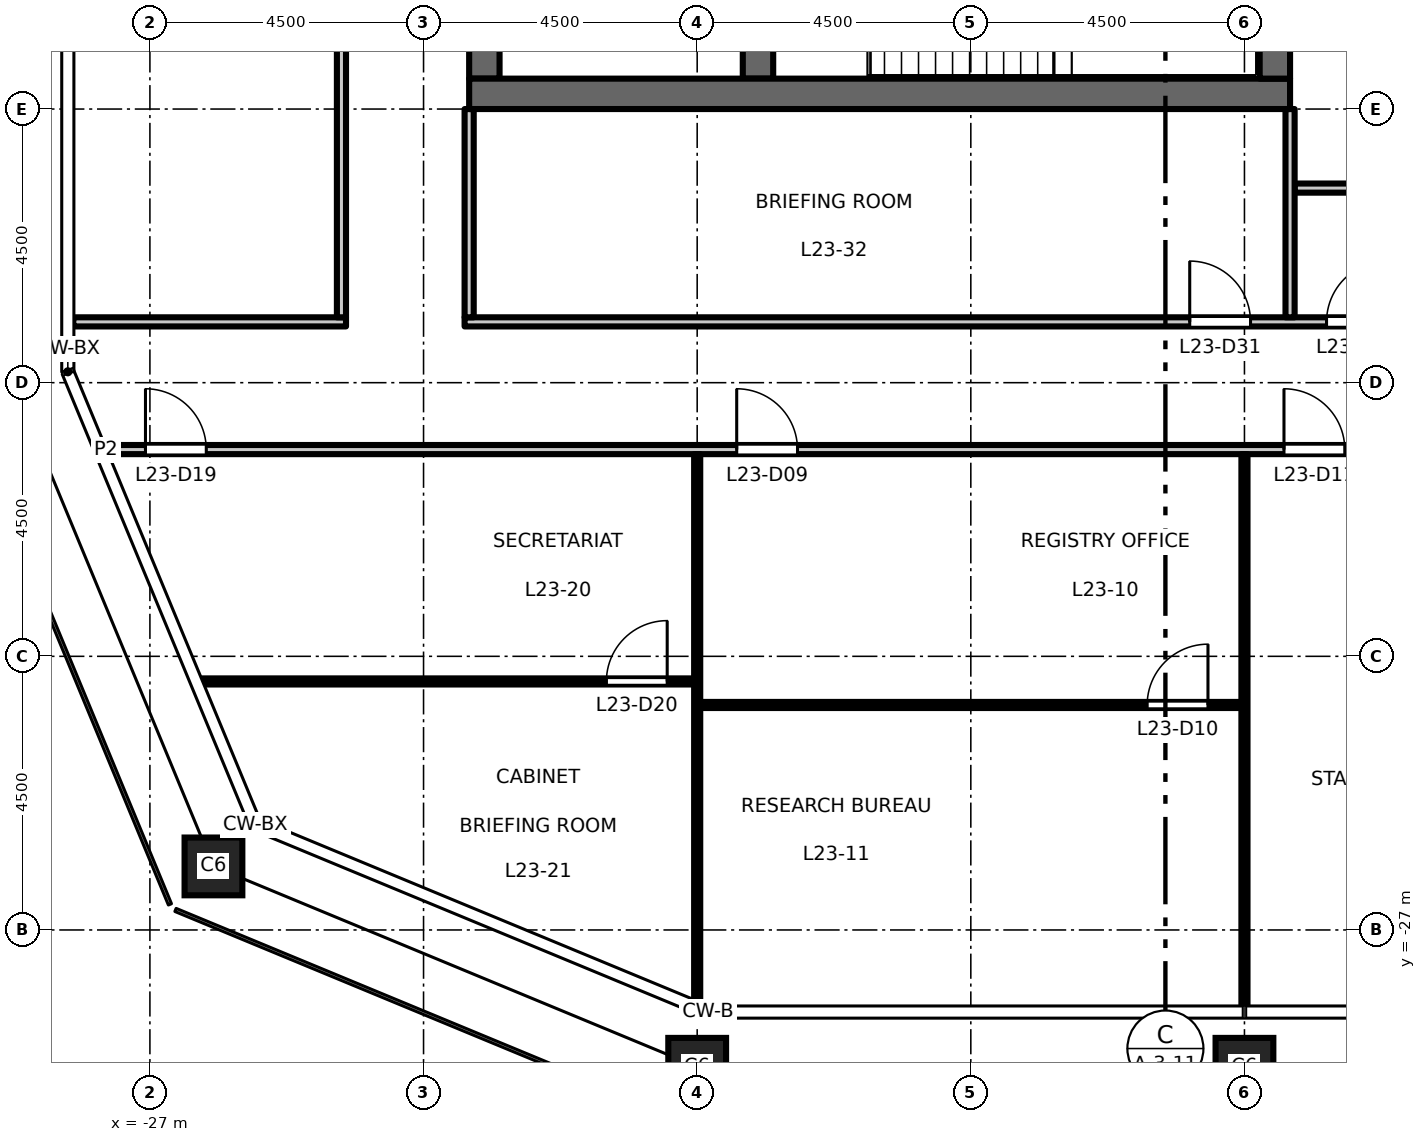
"""IFC4 building model, lengths in metres.
Left out: names, types, materials, properties, quantities, classifications, styles, units other than length and angle.
Written with IfcOpenShell. Run it as: python <this file> out.ifc"""

import sys

from ifc_helpers import new_model, si_unit, direction, frame, frame_2d, origin, origin_2d, place, context, subcontext, project, spatial, rectangle, hollow_rectangle, extrude, element, fill, save


model = new_model("IFC4")
c1 = context("Model", 3, precision=1e-05, world=origin(), true_north=direction((0.0, 1.0)))
c2 = subcontext(c1, "Body", "Model", "MODEL_VIEW")
j1 = project(units=[si_unit("LENGTHUNIT", "METRE"), si_unit("PLANEANGLEUNIT", "RADIAN")], contexts=[c1])
p1 = place(None, origin())
s1 = spatial("IfcSite", under=j1, at=p1, CompositionType="ELEMENT")
p2 = place(p1, origin())
s2 = spatial("IfcBuilding", under=s1, at=p2, CompositionType="ELEMENT")
p3 = place(p2, frame((0.0, 0.0, 109.2)))
s3 = spatial("IfcBuildingStorey", under=s2, at=p3, CompositionType="ELEMENT", Elevation=109.2)
for number, where, z_axis, x_axis in (
    (1, (-18.0, -29.25, 0.0), (0.0, 0.0, 1.0), (1.0, 0.0, 0.0)),
    (2, (-9.0, -29.25, 0.0), (0.0, 0.0, 1.0), (1.0, 0.0, 0.0)),
    (3, (-25.955, -25.955, 0.0), (0.0, 0.0, 1.0), (1.0, 0.0, 0.0)),
):
    element("IfcColumn", number, at=place(p3, frame(where, z_axis=z_axis, x_axis=x_axis)), inside=s3, PredefinedType="COLUMN", context=c2, shape_type="SweptSolid", body=[
        extrude(hollow_rectangle(XDim=0.95, YDim=0.95, WallThickness=0.055, at=origin_2d()), origin(), (0.0, 0.0, 1.0), 4.5),
    ])
p4 = place(p3, frame((-21.5, -13.0, 0.0), z_axis=(0.0, 0.0, 1.0), x_axis=(0.0, 1.0, 0.0)))
e4 = element("IfcWall", 4, at=p4, inside=s3, PredefinedType="SHEAR", context=c2, shape_type="SweptSolid", body=[
    extrude(rectangle(XDim=26.0, YDim=0.5, at=frame_2d((13.0, 0.0))), origin(), (0.0, 0.0, 1.0), 4.35),
])
p5 = place(p4, frame((16.825, 0.0, 0.0)))
e5 = element("IfcOpeningElement", 5, at=p5, cuts=e4, PredefinedType="OPENING", context=c2, shape_type="SweptSolid", body=[
    extrude(rectangle(XDim=1.8, YDim=2.1, at=frame_2d((0.9, 1.05))), frame((0.0, 0.26, 0.0), z_axis=(0.0, -1.0, 0.0), x_axis=(1.0, 0.0, 0.0)), (0.0, 0.0, 1.0), 0.52),
])
p6 = place(p4, frame((7.375, 0.0, 0.0)))
e6 = element("IfcOpeningElement", 6, at=p6, cuts=e4, PredefinedType="OPENING", context=c2, shape_type="SweptSolid", body=[
    extrude(rectangle(XDim=1.8, YDim=2.1, at=frame_2d((0.9, 1.05))), frame((0.0, 0.26, 0.0), z_axis=(0.0, -1.0, 0.0), x_axis=(1.0, 0.0, 0.0)), (0.0, 0.0, 1.0), 0.52),
])
p7 = place(p4, frame((22.45, 0.0, 0.0)))
e7 = element("IfcOpeningElement", 7, at=p7, cuts=e4, PredefinedType="OPENING", context=c2, shape_type="SweptSolid", body=[
    extrude(rectangle(XDim=0.9, YDim=2.1, at=frame_2d((0.45, 1.05))), frame((0.0, 0.26, 0.0), z_axis=(0.0, -1.0, 0.0), x_axis=(1.0, 0.0, 0.0)), (0.0, 0.0, 1.0), 0.52),
])
p8 = place(p4, frame((1.7, 0.0, 0.0)))
e8 = element("IfcOpeningElement", 8, at=p8, cuts=e4, PredefinedType="OPENING", context=c2, shape_type="SweptSolid", body=[
    extrude(rectangle(XDim=0.9, YDim=2.1, at=frame_2d((0.45, 1.05))), frame((0.0, 0.26, 0.0), z_axis=(0.0, -1.0, 0.0), x_axis=(1.0, 0.0, 0.0)), (0.0, 0.0, 1.0), 0.52),
])
p9 = place(p3, frame((-17.0, -13.0, 0.0), z_axis=(0.0, 0.0, 1.0), x_axis=(0.0, 1.0, 0.0)))
e9 = element("IfcWall", 9, at=p9, inside=s3, PredefinedType="SHEAR", context=c2, shape_type="SweptSolid", body=[
    extrude(rectangle(XDim=6.575, YDim=0.5, at=frame_2d((3.288, 0.0))), origin(), (0.0, 0.0, 1.0), 4.35),
])
p10 = place(p3, frame((-8.25, -13.25, 0.0), z_axis=(0.0, 0.0, 1.0), x_axis=(-1.0, 0.0, 0.0)))
e10 = element("IfcWall", 10, at=p10, inside=s3, PredefinedType="SHEAR", context=c2, shape_type="SweptSolid", body=[
    extrude(rectangle(XDim=13.5, YDim=0.5, at=frame_2d((6.75, 0.0))), origin(), (0.0, 0.0, 1.0), 4.35),
])
p11 = place(p3, frame((-8.5, -13.0, 0.0), z_axis=(0.0, 0.0, 1.0), x_axis=(0.0, 1.0, 0.0)))
e11 = element("IfcWall", 11, at=p11, inside=s3, PredefinedType="SHEAR", context=c2, shape_type="SweptSolid", body=[
    extrude(rectangle(XDim=26.0, YDim=0.5, at=frame_2d((13.0, 0.0))), origin(), (0.0, 0.0, 1.0), 4.35),
])
p12 = place(p3, frame((-17.95, -23.3, 0.0), z_axis=(0.0, 0.0, 1.0), x_axis=(1.0, 0.0, 0.0)))
e12 = element("IfcWall", 12, at=p12, inside=s3, PredefinedType="PARTITIONING", context=c2, shape_type="SweptSolid", body=[
    extrude(rectangle(XDim=8.9, YDim=0.1, at=frame_2d((4.45, 0.0))), origin(), (0.0, 0.0, 1.0), 4.35),
])
p13 = place(p12, frame((7.35, 0.0, 0.0)))
e13 = element("IfcOpeningElement", 13, at=p13, cuts=e12, PredefinedType="OPENING", context=c2, shape_type="SweptSolid", body=[
    extrude(rectangle(XDim=1.0, YDim=2.1, at=frame_2d((0.5, 1.05))), frame((0.0, 0.06, 0.0), z_axis=(0.0, -1.0, 0.0), x_axis=(1.0, 0.0, 0.0)), (0.0, 0.0, 1.0), 0.12),
])
p14 = place(p3, frame((-26.143, -22.913, 0.0), z_axis=(0.0, 0.0, 1.0), x_axis=(1.0, 0.0, 0.0)))
e14 = element("IfcWall", 14, at=p14, inside=s3, PredefinedType="PARTITIONING", context=c2, shape_type="SweptSolid", body=[
    extrude(rectangle(XDim=8.093, YDim=0.1, at=frame_2d((4.046, 0.0))), origin(), (0.0, 0.0, 1.0), 4.35),
])
p15 = place(p14, frame((6.65, 0.0, 0.0)))
e15 = element("IfcOpeningElement", 15, at=p15, cuts=e14, PredefinedType="OPENING", context=c2, shape_type="SweptSolid", body=[
    extrude(rectangle(XDim=1.0, YDim=2.1, at=frame_2d((0.5, 1.05))), frame((0.0, 0.06, 0.0), z_axis=(0.0, -1.0, 0.0), x_axis=(1.0, 0.0, 0.0)), (0.0, 0.0, 1.0), 0.12),
])
p16 = place(p3, frame((-27.723, -19.1, 0.0), z_axis=(0.0, 0.0, 1.0), x_axis=(1.0, 0.0, 0.0)))
e16 = element("IfcWall", 16, at=p16, inside=s3, PredefinedType="PARTITIONING", context=c2, shape_type="SweptSolid", body=[
    extrude(rectangle(XDim=55.446, YDim=0.15, at=frame_2d((27.723, 0.0))), origin(), (0.0, 0.0, 1.0), 4.35),
])
p17 = place(p16, frame((10.373, 0.0, 0.0)))
e17 = element("IfcOpeningElement", 17, at=p17, cuts=e16, PredefinedType="OPENING", context=c2, shape_type="SweptSolid", body=[
    extrude(rectangle(XDim=1.0, YDim=2.1, at=frame_2d((0.5, 1.05))), frame((0.0, 0.085, 0.0), z_axis=(0.0, -1.0, 0.0), x_axis=(1.0, 0.0, 0.0)), (0.0, 0.0, 1.0), 0.17),
])
p18 = place(p16, frame((19.373, 0.0, 0.0)))
e18 = element("IfcOpeningElement", 18, at=p18, cuts=e16, PredefinedType="OPENING", context=c2, shape_type="SweptSolid", body=[
    extrude(rectangle(XDim=1.0, YDim=2.1, at=frame_2d((0.5, 1.05))), frame((0.0, 0.085, 0.0), z_axis=(0.0, -1.0, 0.0), x_axis=(1.0, 0.0, 0.0)), (0.0, 0.0, 1.0), 0.17),
])
p19 = place(p16, frame((35.123, 0.0, 0.0)))
e19 = element("IfcOpeningElement", 19, at=p19, cuts=e16, PredefinedType="OPENING", context=c2, shape_type="SweptSolid", body=[
    extrude(rectangle(XDim=1.0, YDim=2.1, at=frame_2d((0.5, 1.05))), frame((0.0, 0.085, 0.0), z_axis=(0.0, -1.0, 0.0), x_axis=(1.0, 0.0, 0.0)), (0.0, 0.0, 1.0), 0.17),
])
p20 = place(p16, frame((44.123, 0.0, 0.0)))
e20 = element("IfcOpeningElement", 20, at=p20, cuts=e16, PredefinedType="OPENING", context=c2, shape_type="SweptSolid", body=[
    extrude(rectangle(XDim=1.0, YDim=2.1, at=frame_2d((0.5, 1.05))), frame((0.0, 0.085, 0.0), z_axis=(0.0, -1.0, 0.0), x_axis=(1.0, 0.0, 0.0)), (0.0, 0.0, 1.0), 0.17),
])
p21 = place(p16, frame((0.65, 0.0, 0.0)))
e21 = element("IfcOpeningElement", 21, at=p21, cuts=e16, PredefinedType="OPENING", context=c2, shape_type="SweptSolid", body=[
    extrude(rectangle(XDim=1.0, YDim=2.1, at=frame_2d((0.5, 1.05))), frame((0.0, 0.085, 0.0), z_axis=(0.0, -1.0, 0.0), x_axis=(1.0, 0.0, 0.0)), (0.0, 0.0, 1.0), 0.17),
])
p22 = place(p16, frame((46.373, 0.0, 0.0)))
e22 = element("IfcOpeningElement", 22, at=p22, cuts=e16, PredefinedType="OPENING", context=c2, shape_type="SweptSolid", body=[
    extrude(rectangle(XDim=1.0, YDim=2.1, at=frame_2d((0.5, 1.05))), frame((0.0, 0.085, 0.0), z_axis=(0.0, -1.0, 0.0), x_axis=(1.0, 0.0, 0.0)), (0.0, 0.0, 1.0), 0.17),
])
p23 = place(p3, frame((-28.26, -17.0, 0.0), z_axis=(0.0, 0.0, 1.0), x_axis=(1.0, 0.0, 0.0)))
e23 = element("IfcWall", 23, at=p23, inside=s3, PredefinedType="PARTITIONING", context=c2, shape_type="SweptSolid", body=[
    extrude(rectangle(XDim=4.485, YDim=0.15, at=frame_2d((2.243, 0.0))), origin(), (0.0, 0.0, 1.0), 4.35),
])
p24 = place(p3, frame((-21.825, -17.0, 0.0), z_axis=(0.0, 0.0, 1.0), x_axis=(1.0, 0.0, 0.0)))
e24 = element("IfcWall", 24, at=p24, inside=s3, PredefinedType="PARTITIONING", context=c2, shape_type="SweptSolid", body=[
    extrude(rectangle(XDim=43.65, YDim=0.15, at=frame_2d((21.825, 0.0))), origin(), (0.0, 0.0, 1.0), 4.35),
])
p25 = place(p24, frame((14.175, 0.0, 0.0)))
e25 = element("IfcOpeningElement", 25, at=p25, cuts=e24, PredefinedType="OPENING", context=c2, shape_type="SweptSolid", body=[
    extrude(rectangle(XDim=1.0, YDim=2.1, at=frame_2d((0.5, 1.05))), frame((0.0, 0.085, 0.0), z_axis=(0.0, -1.0, 0.0), x_axis=(1.0, 0.0, 0.0)), (0.0, 0.0, 1.0), 0.17),
])
p26 = place(p24, frame((11.925, 0.0, 0.0)))
e26 = element("IfcOpeningElement", 26, at=p26, cuts=e24, PredefinedType="OPENING", context=c2, shape_type="SweptSolid", body=[
    extrude(rectangle(XDim=1.0, YDim=2.1, at=frame_2d((0.5, 1.05))), frame((0.0, 0.085, 0.0), z_axis=(0.0, -1.0, 0.0), x_axis=(1.0, 0.0, 0.0)), (0.0, 0.0, 1.0), 0.17),
])
p27 = place(p24, frame((30.675, 0.0, 0.0)))
e27 = element("IfcOpeningElement", 27, at=p27, cuts=e24, PredefinedType="OPENING", context=c2, shape_type="SweptSolid", body=[
    extrude(rectangle(XDim=1.0, YDim=2.1, at=frame_2d((0.5, 1.05))), frame((0.0, 0.085, 0.0), z_axis=(0.0, -1.0, 0.0), x_axis=(1.0, 0.0, 0.0)), (0.0, 0.0, 1.0), 0.17),
])
p28 = place(p3, frame((-8.175, -14.8, 0.0), z_axis=(0.0, 0.0, 1.0), x_axis=(1.0, 0.0, 0.0)))
e28 = element("IfcWall", 28, at=p28, inside=s3, PredefinedType="PARTITIONING", context=c2, shape_type="SweptSolid", body=[
    extrude(rectangle(XDim=15.095, YDim=0.15, at=frame_2d((7.547, 0.0))), origin(), (0.0, 0.0, 1.0), 4.35),
])
p29 = place(p28, frame((4.525, 0.0, 0.0)))
e29 = element("IfcOpeningElement", 29, at=p29, cuts=e28, PredefinedType="OPENING", context=c2, shape_type="SweptSolid", body=[
    extrude(rectangle(XDim=1.0, YDim=2.1, at=frame_2d((0.5, 1.05))), frame((0.0, 0.085, 0.0), z_axis=(0.0, -1.0, 0.0), x_axis=(1.0, 0.0, 0.0)), (0.0, 0.0, 1.0), 0.17),
])
p30 = place(p28, frame((6.775, 0.0, 0.0)))
e30 = element("IfcOpeningElement", 30, at=p30, cuts=e28, PredefinedType="OPENING", context=c2, shape_type="SweptSolid", body=[
    extrude(rectangle(XDim=1.0, YDim=2.1, at=frame_2d((0.5, 1.05))), frame((0.0, 0.085, 0.0), z_axis=(0.0, -1.0, 0.0), x_axis=(1.0, 0.0, 0.0)), (0.0, 0.0, 1.0), 0.17),
])
p31 = place(p28, frame((13.445, 0.0, 0.0)))
e31 = element("IfcOpeningElement", 31, at=p31, cuts=e28, PredefinedType="OPENING", context=c2, shape_type="SweptSolid", body=[
    extrude(rectangle(XDim=1.0, YDim=2.1, at=frame_2d((0.5, 1.05))), frame((0.0, 0.085, 0.0), z_axis=(0.0, -1.0, 0.0), x_axis=(1.0, 0.0, 0.0)), (0.0, 0.0, 1.0), 0.17),
])
p32 = place(p3, frame((-23.85, -16.925, 0.0), z_axis=(0.0, 0.0, 1.0), x_axis=(0.0, 1.0, 0.0)))
e32 = element("IfcWall", 32, at=p32, inside=s3, PredefinedType="PARTITIONING", context=c2, shape_type="SweptSolid", body=[
    extrude(rectangle(XDim=33.85, YDim=0.15, at=frame_2d((16.925, 0.0))), origin(), (0.0, 0.0, 1.0), 4.35),
])
p33 = place(p32, frame((32.275, 0.0, 0.0)))
e33 = element("IfcOpeningElement", 33, at=p33, cuts=e32, PredefinedType="OPENING", context=c2, shape_type="SweptSolid", body=[
    extrude(rectangle(XDim=1.0, YDim=2.1, at=frame_2d((0.5, 1.05))), frame((0.0, 0.085, 0.0), z_axis=(0.0, -1.0, 0.0), x_axis=(1.0, 0.0, 0.0)), (0.0, 0.0, 1.0), 0.17),
])
p34 = place(p3, frame((-21.75, -16.925, 0.0), z_axis=(0.0, 0.0, 1.0), x_axis=(0.0, 1.0, 0.0)))
e34 = element("IfcWall", 34, at=p34, inside=s3, PredefinedType="PARTITIONING", context=c2, shape_type="SweptSolid", body=[
    extrude(rectangle(XDim=3.425, YDim=0.15, at=frame_2d((1.712, 0.0))), origin(), (0.0, 0.0, 1.0), 4.35),
])
p35 = place(p3, frame((-18.0, -28.178, 0.0), z_axis=(0.0, 0.0, 1.0), x_axis=(0.0, 1.0, 0.0)))
e35 = element("IfcWall", 35, at=p35, inside=s3, PredefinedType="PARTITIONING", context=c2, shape_type="SweptSolid", body=[
    extrude(rectangle(XDim=9.003, YDim=0.1, at=frame_2d((4.501, 0.0))), origin(), (0.0, 0.0, 1.0), 3.45),
])
p36 = place(p3, frame((-9.0, -28.26, 0.0), z_axis=(0.0, 0.0, 1.0), x_axis=(0.0, 1.0, 0.0)))
e36 = element("IfcWall", 36, at=p36, inside=s3, PredefinedType="PARTITIONING", context=c2, shape_type="SweptSolid", body=[
    extrude(rectangle(XDim=9.085, YDim=0.1, at=frame_2d((4.542, 0.0))), origin(), (0.0, 0.0, 1.0), 3.45),
])
p37 = place(p3, frame((-8.25, -16.925, 0.0), z_axis=(0.0, 0.0, 1.0), x_axis=(0.0, 1.0, 0.0)))
e37 = element("IfcWall", 37, at=p37, inside=s3, PredefinedType="PARTITIONING", context=c2, shape_type="SweptSolid", body=[
    extrude(rectangle(XDim=3.425, YDim=0.15, at=frame_2d((1.712, 0.0))), origin(), (0.0, 0.0, 1.0), 4.35),
])
p38 = place(p17, origin())
e38 = element("IfcDoor", 38, at=p38, inside=s3, OperationType="SINGLE_SWING_LEFT", PredefinedType="DOOR", context=c2, shape_type="SweptSolid", body=[
    extrude(rectangle(XDim=1.0, YDim=2.1, at=frame_2d((0.5, 1.05))), frame((0.0, 0.025, 0.0), z_axis=(0.0, -1.0, 0.0), x_axis=(1.0, 0.0, 0.0)), (0.0, 0.0, 1.0), 0.05),
])
fill(e17, e38)
p39 = place(p13, origin())
e39 = element("IfcDoor", 39, at=p39, inside=s3, OperationType="SINGLE_SWING_RIGHT", PredefinedType="DOOR", context=c2, shape_type="SweptSolid", body=[
    extrude(rectangle(XDim=1.0, YDim=2.1, at=frame_2d((0.5, 1.05))), frame((0.0, 0.025, 0.0), z_axis=(0.0, -1.0, 0.0), x_axis=(1.0, 0.0, 0.0)), (0.0, 0.0, 1.0), 0.05),
])
fill(e13, e39)
p40 = place(p18, origin())
e40 = element("IfcDoor", 40, at=p40, inside=s3, OperationType="SINGLE_SWING_LEFT", PredefinedType="DOOR", context=c2, shape_type="SweptSolid", body=[
    extrude(rectangle(XDim=1.0, YDim=2.1, at=frame_2d((0.5, 1.05))), frame((0.0, 0.025, 0.0), z_axis=(0.0, -1.0, 0.0), x_axis=(1.0, 0.0, 0.0)), (0.0, 0.0, 1.0), 0.05),
])
fill(e18, e40)
p41 = place(p21, origin())
e41 = element("IfcDoor", 41, at=p41, inside=s3, OperationType="SINGLE_SWING_LEFT", PredefinedType="DOOR", context=c2, shape_type="SweptSolid", body=[
    extrude(rectangle(XDim=1.0, YDim=2.1, at=frame_2d((0.5, 1.05))), frame((0.0, 0.025, 0.0), z_axis=(0.0, -1.0, 0.0), x_axis=(1.0, 0.0, 0.0)), (0.0, 0.0, 1.0), 0.05),
])
fill(e21, e41)
p42 = place(p15, origin())
e42 = element("IfcDoor", 42, at=p42, inside=s3, OperationType="SINGLE_SWING_RIGHT", PredefinedType="DOOR", context=c2, shape_type="SweptSolid", body=[
    extrude(rectangle(XDim=1.0, YDim=2.1, at=frame_2d((0.5, 1.05))), frame((0.0, 0.025, 0.0), z_axis=(0.0, -1.0, 0.0), x_axis=(1.0, 0.0, 0.0)), (0.0, 0.0, 1.0), 0.05),
])
fill(e15, e42)
p43 = place(p25, origin())
e43 = element("IfcDoor", 43, at=p43, inside=s3, OperationType="SINGLE_SWING_RIGHT", PredefinedType="DOOR", context=c2, shape_type="SweptSolid", body=[
    extrude(rectangle(XDim=1.0, YDim=2.1, at=frame_2d((0.5, 1.05))), frame((0.0, 0.025, 0.0), z_axis=(0.0, -1.0, 0.0), x_axis=(1.0, 0.0, 0.0)), (0.0, 0.0, 1.0), 0.05),
])
fill(e25, e43)
p44 = place(p26, origin())
e44 = element("IfcDoor", 44, at=p44, inside=s3, OperationType="SINGLE_SWING_LEFT", PredefinedType="DOOR", context=c2, shape_type="SweptSolid", body=[
    extrude(rectangle(XDim=1.0, YDim=2.1, at=frame_2d((0.5, 1.05))), frame((0.0, 0.025, 0.0), z_axis=(0.0, -1.0, 0.0), x_axis=(1.0, 0.0, 0.0)), (0.0, 0.0, 1.0), 0.05),
])
fill(e26, e44)
save(model, sys.argv[1])
